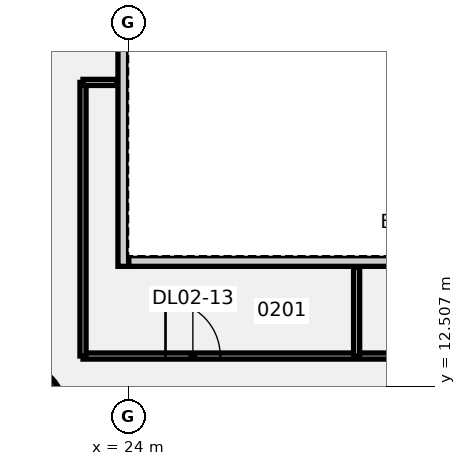
"""IFC4 building model, lengths in metres.
Left out: names, types, materials, properties, quantities, classifications, styles, units other than length and angle.
Written with IfcOpenShell. Run it as: python <this file> out.ifc"""

import sys

from ifc_helpers import new_model, si_unit, direction, frame, frame_2d, origin, origin_2d, place, context, subcontext, project, spatial, rectangle, circle, extrude, element, fill, save


model = new_model("IFC4")
c1 = context("Model", 3, precision=1e-05, world=origin(), true_north=direction((0.0, 1.0)))
c2 = subcontext(c1, "Body", "Model", "MODEL_VIEW")
j1 = project(units=[si_unit("LENGTHUNIT", "METRE"), si_unit("PLANEANGLEUNIT", "RADIAN")], contexts=[c1])
p1 = place(None, origin())
s1 = spatial("IfcSite", under=j1, at=p1, CompositionType="ELEMENT")
p2 = place(p1, origin())
s2 = spatial("IfcBuilding", under=s1, at=p2, CompositionType="ELEMENT")
p3 = place(p2, frame((0.0, 0.0, 15.0)))
s3 = spatial("IfcBuildingStorey", under=s2, at=p3, CompositionType="ELEMENT", Elevation=15.0)
p4 = place(p3, frame((20.543, 11.86, -0.5), z_axis=(0.0, 0.0, 1.0), x_axis=(1.0, 0.0, 0.0)))
e1 = element("IfcColumn", 1, at=p4, inside=s3, PredefinedType="COLUMN", context=c2, shape_type="SweptSolid", body=[
    extrude(circle(Radius=1.3, at=origin_2d()), origin(), (0.0, 0.0, 1.0), 5.0),
])
p5 = place(p3, frame((22.5, 13.5, 0.0), z_axis=(0.0, 0.0, 1.0), x_axis=(1.0, 0.0, 0.0)))
e2 = element("IfcWall", 2, at=p5, inside=s3, PredefinedType="PARTITIONING", context=c2, shape_type="SweptSolid", body=[
    extrude(rectangle(XDim=43.199, YDim=0.2, at=frame_2d((21.6, 0.0))), origin(), (0.0, 0.0, 1.0), 4.5),
])
p6 = place(p5, frame((2.714, 0.0, 0.0)))
e3 = element("IfcOpeningElement", 3, at=p6, cuts=e2, PredefinedType="OPENING", context=c2, shape_type="SweptSolid", body=[
    extrude(rectangle(XDim=1.8, YDim=2.1, at=frame_2d((0.9, 1.05))), frame((0.0, 0.11, 0.0), z_axis=(0.0, -1.0, 0.0), x_axis=(1.0, 0.0, 0.0)), (0.0, 0.0, 1.0), 0.22),
])
p7 = place(p5, frame((13.225, 0.0, 0.0)))
e4 = element("IfcOpeningElement", 4, at=p7, cuts=e2, PredefinedType="OPENING", context=c2, shape_type="SweptSolid", body=[
    extrude(rectangle(XDim=1.8, YDim=2.1, at=frame_2d((0.9, 1.05))), frame((0.0, 0.11, 0.0), z_axis=(0.0, -1.0, 0.0), x_axis=(1.0, 0.0, 0.0)), (0.0, 0.0, 1.0), 0.22),
])
p8 = place(p5, frame((26.11, 0.0, 0.0)))
e5 = element("IfcOpeningElement", 5, at=p8, cuts=e2, PredefinedType="OPENING", context=c2, shape_type="SweptSolid", body=[
    extrude(rectangle(XDim=1.8, YDim=2.1, at=frame_2d((0.9, 1.05))), frame((0.0, 0.11, 0.0), z_axis=(0.0, -1.0, 0.0), x_axis=(1.0, 0.0, 0.0)), (0.0, 0.0, 1.0), 0.22),
])
p9 = place(p5, frame((38.7, 0.0, 0.0)))
e6 = element("IfcOpeningElement", 6, at=p9, cuts=e2, PredefinedType="OPENING", context=c2, shape_type="SweptSolid", body=[
    extrude(rectangle(XDim=1.8, YDim=2.1, at=frame_2d((0.9, 1.05))), frame((0.0, 0.11, 0.0), z_axis=(0.0, -1.0, 0.0), x_axis=(1.0, 0.0, 0.0)), (0.0, 0.0, 1.0), 0.22),
])
p10 = place(p3, frame((22.5, 13.5, 0.0), z_axis=(0.0, 0.0, 1.0), x_axis=(0.0, 1.0, 0.0)))
e7 = element("IfcWall", 7, at=p10, inside=s3, PredefinedType="PARTITIONING", context=c2, shape_type="SweptSolid", body=[
    extrude(rectangle(XDim=9.0, YDim=0.2, at=frame_2d((4.5, 0.0))), origin(), (0.0, 0.0, 1.0), 4.5),
])
p11 = place(p3, frame((22.5, 22.5, 0.0), z_axis=(0.0, 0.0, 1.0), x_axis=(1.0, 0.0, 0.0)))
e8 = element("IfcWall", 8, at=p11, inside=s3, PredefinedType="PARTITIONING", context=c2, shape_type="SweptSolid", body=[
    extrude(rectangle(XDim=1.12, YDim=0.2, at=frame_2d((0.56, 0.0))), origin(), (0.0, 0.0, 1.0), 4.5),
])
p12 = place(p3, frame((31.5, 13.5, 0.0), z_axis=(0.0, 0.0, 1.0), x_axis=(0.0, 1.0, 0.0)))
e9 = element("IfcWall", 9, at=p12, inside=s3, PredefinedType="PARTITIONING", context=c2, shape_type="SweptSolid", body=[
    extrude(rectangle(XDim=2.92, YDim=0.2, at=frame_2d((1.46, 0.0))), origin(), (0.0, 0.0, 1.0), 4.5),
])
p13 = place(p3, frame((24.0, 16.625, 0.0), z_axis=(0.0, 0.0, 1.0), x_axis=(1.0, 0.0, 0.0)))
e10 = element("IfcWall", 10, at=p13, inside=s3, PredefinedType="SOLIDWALL", context=c2, shape_type="SweptSolid", body=[
    extrude(rectangle(XDim=18.0, YDim=0.35, at=frame_2d((9.0, 0.0))), origin(), (0.0, 0.0, 1.0), 4.5),
])
p14 = place(p13, frame((13.95, 0.0, 1.0)))
e11 = element("IfcOpeningElement", 11, at=p14, cuts=e10, PredefinedType="OPENING", context=c2, shape_type="SweptSolid", body=[
    extrude(rectangle(XDim=2.4, YDim=1.8, at=frame_2d((1.2, 0.9))), frame((0.0, 0.185, 0.0), z_axis=(0.0, -1.0, 0.0), x_axis=(1.0, 0.0, 0.0)), (0.0, 0.0, 1.0), 0.37),
])
p15 = place(p3, frame((23.825, 16.45, 0.0), z_axis=(0.0, 0.0, 1.0), x_axis=(0.0, 1.0, 0.0)))
e12 = element("IfcWall", 12, at=p15, inside=s3, PredefinedType="SOLIDWALL", context=c2, shape_type="SweptSolid", body=[
    extrude(rectangle(XDim=27.4, YDim=0.35, at=frame_2d((13.7, 0.0))), origin(), (0.0, 0.0, 1.0), 4.5),
])
p16 = place(p15, frame((14.9, 0.0, 1.0)))
e13 = element("IfcOpeningElement", 13, at=p16, cuts=e12, PredefinedType="OPENING", context=c2, shape_type="SweptSolid", body=[
    extrude(rectangle(XDim=2.4, YDim=1.8, at=frame_2d((1.2, 0.9))), frame((0.0, 0.185, 0.0), z_axis=(0.0, -1.0, 0.0), x_axis=(1.0, 0.0, 0.0)), (0.0, 0.0, 1.0), 0.37),
])
p17 = place(p6, origin())
e14 = element("IfcDoor", 14, at=p17, inside=s3, OperationType="SINGLE_SWING_LEFT", PredefinedType="DOOR", context=c2, shape_type="SweptSolid", body=[
    extrude(rectangle(XDim=1.8, YDim=2.1, at=frame_2d((0.9, 1.05))), frame((0.0, 0.025, 0.0), z_axis=(0.0, -1.0, 0.0), x_axis=(1.0, 0.0, 0.0)), (0.0, 0.0, 1.0), 0.05),
])
fill(e3, e14)
save(model, sys.argv[1])
